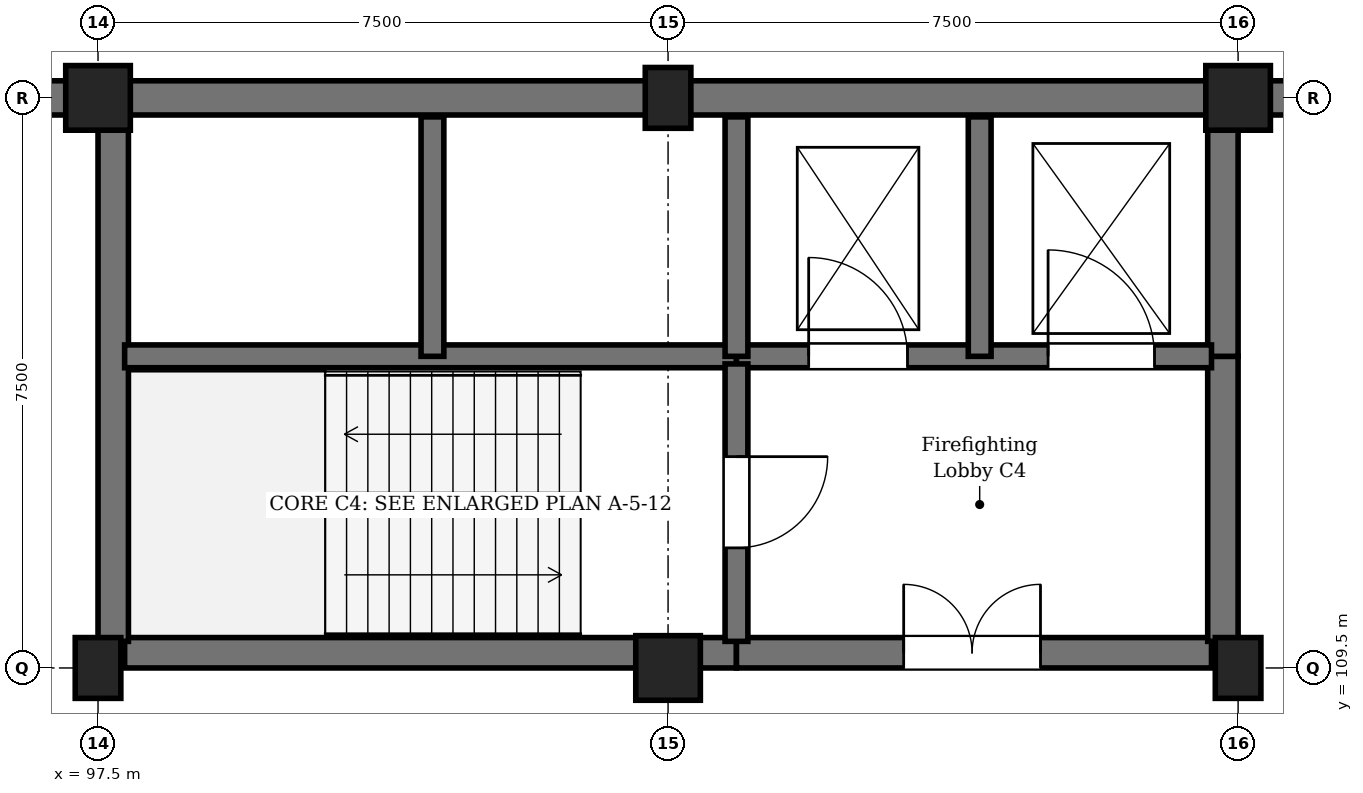
"""IFC4 building model, lengths in metres.
Left out: names, types, materials, properties, quantities, classifications, styles, units other than length and angle.
Written with IfcOpenShell. Run it as: python <this file> out.ifc"""

import sys

from ifc_helpers import new_model, si_unit, direction, frame, frame_2d, origin, origin_2d, place, context, subcontext, project, spatial, rectangle, extrude, element, fill, save


model = new_model("IFC4")
c1 = context("Model", 3, precision=1e-05, world=origin(), true_north=direction((0.0, 1.0)))
c2 = subcontext(c1, "Body", "Model", "MODEL_VIEW")
j1 = project(units=[si_unit("LENGTHUNIT", "METRE"), si_unit("PLANEANGLEUNIT", "RADIAN")], contexts=[c1])
p1 = place(None, origin())
s1 = spatial("IfcSite", under=j1, at=p1, CompositionType="ELEMENT")
p2 = place(p1, origin())
s2 = spatial("IfcBuilding", under=s1, at=p2, CompositionType="ELEMENT")
p3 = place(p2, frame((0.0, 0.0, -4.5)))
s3 = spatial("IfcBuildingStorey", under=s2, at=p3, CompositionType="ELEMENT", Elevation=-4.5)
p4 = place(p3, frame((97.5, 109.5, 0.0), z_axis=(0.0, 0.0, 1.0), x_axis=(1.0, 0.0, 0.0)))
e1 = element("IfcColumn", 1, at=p4, inside=s3, PredefinedType="COLUMN", context=c2, shape_type="SweptSolid", body=[
    extrude(rectangle(XDim=0.6, YDim=0.8, at=origin_2d()), origin(), (0.0, 0.0, 1.0), 4.5),
])
for number, where, z_axis, x_axis in (
    (2, (97.5, 117.0, 0.0), (0.0, 0.0, 1.0), (1.0, 0.0, 0.0)),
    (3, (105.0, 109.5, 0.0), (0.0, 0.0, 1.0), (1.0, 0.0, 0.0)),
):
    element("IfcColumn", number, at=place(p3, frame(where, z_axis=z_axis, x_axis=x_axis)), inside=s3, PredefinedType="COLUMN", context=c2, shape_type="SweptSolid", body=[
        extrude(rectangle(XDim=0.85, YDim=0.85, at=origin_2d()), origin(), (0.0, 0.0, 1.0), 4.5),
    ])
for number, where, z_axis, x_axis in (
    (4, (105.0, 117.0, 0.0), (0.0, 0.0, 1.0), (1.0, 0.0, 0.0)),
    (5, (112.5, 109.5, 0.0), (0.0, 0.0, 1.0), (1.0, 0.0, 0.0)),
):
    element("IfcColumn", number, at=place(p3, frame(where, z_axis=z_axis, x_axis=x_axis)), inside=s3, PredefinedType="COLUMN", context=c2, shape_type="SweptSolid", body=[
        extrude(rectangle(XDim=0.6, YDim=0.8, at=origin_2d()), origin(), (0.0, 0.0, 1.0), 4.5),
    ])
p5 = place(p3, frame((112.5, 117.0, 0.0), z_axis=(0.0, 0.0, 1.0), x_axis=(1.0, 0.0, 0.0)))
e6 = element("IfcColumn", 6, at=p5, inside=s3, PredefinedType="COLUMN", context=c2, shape_type="SweptSolid", body=[
    extrude(rectangle(XDim=0.85, YDim=0.85, at=origin_2d()), origin(), (0.0, 0.0, 1.0), 4.5),
])
for number, where, z_axis, x_axis in (
    (7, (90.0, 117.0, 0.0), (0.0, 0.0, 1.0), (1.0, 0.0, 0.0)),
    (8, (97.5, 117.0, 0.0), (0.0, 0.0, 1.0), (1.0, 0.0, 0.0)),
    (9, (105.0, 117.0, 0.0), (0.0, 0.0, 1.0), (1.0, 0.0, 0.0)),
    (10, (112.5, 117.0, 0.0), (0.0, 0.0, 1.0), (1.0, 0.0, 0.0)),
):
    element("IfcWall", number, at=place(p3, frame(where, z_axis=z_axis, x_axis=x_axis)), inside=s3, PredefinedType="SOLIDWALL", context=c2, shape_type="SweptSolid", body=[
        extrude(rectangle(XDim=7.5, YDim=0.45, at=frame_2d((3.75, 0.0))), origin(), (0.0, 0.0, 1.0), 4.14),
    ])
p6 = place(p3, frame((97.85, 109.7, 0.0), z_axis=(0.0, 0.0, 1.0), x_axis=(1.0, 0.0, 0.0)))
e11 = element("IfcWall", 11, at=p6, inside=s3, PredefinedType="SHEAR", context=c2, shape_type="SweptSolid", body=[
    extrude(rectangle(XDim=8.05, YDim=0.4, at=frame_2d((4.025, 0.0))), origin(), (0.0, 0.0, 1.0), 4.14),
])
p7 = place(p3, frame((105.9, 109.7, 0.0), z_axis=(0.0, 0.0, 1.0), x_axis=(1.0, 0.0, 0.0)))
e12 = element("IfcWall", 12, at=p7, inside=s3, PredefinedType="SHEAR", context=c2, shape_type="SweptSolid", body=[
    extrude(rectangle(XDim=6.25, YDim=0.4, at=frame_2d((3.125, 0.0))), origin(), (0.0, 0.0, 1.0), 4.14),
])
p8 = place(p7, frame((2.2, 0.0, 0.0)))
e13 = element("IfcOpeningElement", 13, at=p8, cuts=e12, PredefinedType="OPENING", context=c2, shape_type="SweptSolid", body=[
    extrude(rectangle(XDim=1.8, YDim=2.25, at=frame_2d((0.9, 1.125))), frame((0.0, 0.21, 0.0), z_axis=(0.0, -1.0, 0.0), x_axis=(1.0, 0.0, 0.0)), (0.0, 0.0, 1.0), 0.42),
])
p9 = place(p3, frame((97.7, 109.85, 0.0), z_axis=(0.0, 0.0, 1.0), x_axis=(0.0, 1.0, 0.0)))
e14 = element("IfcWall", 14, at=p9, inside=s3, PredefinedType="SHEAR", context=c2, shape_type="SweptSolid", body=[
    extrude(rectangle(XDim=6.8, YDim=0.4, at=frame_2d((3.4, 0.0))), origin(), (0.0, 0.0, 1.0), 4.14),
])
p10 = place(p3, frame((112.3, 109.85, 0.0), z_axis=(0.0, 0.0, 1.0), x_axis=(0.0, 1.0, 0.0)))
e15 = element("IfcWall", 15, at=p10, inside=s3, PredefinedType="SHEAR", context=c2, shape_type="SweptSolid", body=[
    extrude(rectangle(XDim=3.75, YDim=0.4, at=frame_2d((1.875, 0.0))), origin(), (0.0, 0.0, 1.0), 4.14),
])
p11 = place(p3, frame((112.3, 113.6, 0.0), z_axis=(0.0, 0.0, 1.0), x_axis=(0.0, 1.0, 0.0)))
e16 = element("IfcWall", 16, at=p11, inside=s3, PredefinedType="SHEAR", context=c2, shape_type="SweptSolid", body=[
    extrude(rectangle(XDim=3.05, YDim=0.4, at=frame_2d((1.525, 0.0))), origin(), (0.0, 0.0, 1.0), 4.14),
])
p12 = place(p3, frame((97.85, 113.6, 0.0), z_axis=(0.0, 0.0, 1.0), x_axis=(1.0, 0.0, 0.0)))
e17 = element("IfcWall", 17, at=p12, inside=s3, PredefinedType="SHEAR", context=c2, shape_type="SweptSolid", body=[
    extrude(rectangle(XDim=8.05, YDim=0.3, at=frame_2d((4.025, 0.0))), origin(), (0.0, 0.0, 1.0), 4.14),
])
p13 = place(p3, frame((105.9, 113.6, 0.0), z_axis=(0.0, 0.0, 1.0), x_axis=(1.0, 0.0, 0.0)))
e18 = element("IfcWall", 18, at=p13, inside=s3, PredefinedType="SHEAR", context=c2, shape_type="SweptSolid", body=[
    extrude(rectangle(XDim=6.25, YDim=0.3, at=frame_2d((3.125, 0.0))), origin(), (0.0, 0.0, 1.0), 4.14),
])
p14 = place(p13, frame((0.95, 0.0, 0.0)))
e19 = element("IfcOpeningElement", 19, at=p14, cuts=e18, PredefinedType="OPENING", context=c2, shape_type="SweptSolid", body=[
    extrude(rectangle(XDim=1.3, YDim=2.2, at=frame_2d((0.65, 1.1))), frame((0.0, 0.16, 0.0), z_axis=(0.0, -1.0, 0.0), x_axis=(1.0, 0.0, 0.0)), (0.0, 0.0, 1.0), 0.32),
])
p15 = place(p13, frame((4.1, 0.0, 0.0)))
e20 = element("IfcOpeningElement", 20, at=p15, cuts=e18, PredefinedType="OPENING", context=c2, shape_type="SweptSolid", body=[
    extrude(rectangle(XDim=1.4, YDim=2.25, at=frame_2d((0.7, 1.125))), frame((0.0, 0.16, 0.0), z_axis=(0.0, -1.0, 0.0), x_axis=(1.0, 0.0, 0.0)), (0.0, 0.0, 1.0), 0.32),
])
p16 = place(p3, frame((105.9, 113.5, 0.0), z_axis=(0.0, 0.0, 1.0), x_axis=(0.0, -1.0, 0.0)))
e21 = element("IfcWall", 21, at=p16, inside=s3, PredefinedType="SHEAR", context=c2, shape_type="SweptSolid", body=[
    extrude(rectangle(XDim=3.65, YDim=0.3, at=frame_2d((1.825, 0.0))), origin(), (0.0, 0.0, 1.0), 4.14),
])
p17 = place(p16, frame((1.22, 0.0, 0.0)))
e22 = element("IfcOpeningElement", 22, at=p17, cuts=e21, PredefinedType="OPENING", context=c2, shape_type="SweptSolid", body=[
    extrude(rectangle(XDim=1.2, YDim=2.25, at=frame_2d((0.6, 1.125))), frame((0.0, 0.16, 0.0), z_axis=(0.0, -1.0, 0.0), x_axis=(1.0, 0.0, 0.0)), (0.0, 0.0, 1.0), 0.32),
])
for number, where, z_axis, x_axis in (
    (23, (101.9, 113.6, 0.0), (0.0, 0.0, 1.0), (0.0, 1.0, 0.0)),
    (24, (105.9, 113.6, 0.0), (0.0, 0.0, 1.0), (0.0, 1.0, 0.0)),
    (25, (109.1, 113.6, 0.0), (0.0, 0.0, 1.0), (0.0, 1.0, 0.0)),
):
    element("IfcWall", number, at=place(p3, frame(where, z_axis=z_axis, x_axis=x_axis)), inside=s3, PredefinedType="SHEAR", context=c2, shape_type="SweptSolid", body=[
        extrude(rectangle(XDim=3.15, YDim=0.3, at=frame_2d((1.575, 0.0))), origin(), (0.0, 0.0, 1.0), 4.14),
    ])
p18 = place(p8, origin())
e26 = element("IfcDoor", 26, at=p18, inside=s3, OperationType="DOUBLE_DOOR_SINGLE_SWING", PredefinedType="DOOR", context=c2, shape_type="SweptSolid", body=[
    extrude(rectangle(XDim=1.8, YDim=2.25, at=frame_2d((0.9, 1.125))), frame((0.0, 0.025, 0.0), z_axis=(0.0, -1.0, 0.0), x_axis=(1.0, 0.0, 0.0)), (0.0, 0.0, 1.0), 0.05),
])
fill(e13, e26)
p19 = place(p14, origin())
e27 = element("IfcDoor", 27, at=p19, inside=s3, OperationType="DOUBLE_DOOR_SLIDING", PredefinedType="DOOR", context=c2, shape_type="SweptSolid", body=[
    extrude(rectangle(XDim=1.3, YDim=2.2, at=frame_2d((0.65, 1.1))), frame((0.0, 0.025, 0.0), z_axis=(0.0, -1.0, 0.0), x_axis=(1.0, 0.0, 0.0)), (0.0, 0.0, 1.0), 0.05),
])
fill(e19, e27)
p20 = place(p15, origin())
e28 = element("IfcDoor", 28, at=p20, inside=s3, OperationType="DOUBLE_DOOR_SLIDING", PredefinedType="DOOR", context=c2, shape_type="SweptSolid", body=[
    extrude(rectangle(XDim=1.4, YDim=2.25, at=frame_2d((0.7, 1.125))), frame((0.0, 0.025, 0.0), z_axis=(0.0, -1.0, 0.0), x_axis=(1.0, 0.0, 0.0)), (0.0, 0.0, 1.0), 0.05),
])
fill(e20, e28)
p21 = place(p17, origin())
e29 = element("IfcDoor", 29, at=p21, inside=s3, OperationType="SINGLE_SWING_LEFT", PredefinedType="DOOR", context=c2, shape_type="SweptSolid", body=[
    extrude(rectangle(XDim=1.2, YDim=2.25, at=frame_2d((0.6, 1.125))), frame((0.0, 0.025, 0.0), z_axis=(0.0, -1.0, 0.0), x_axis=(1.0, 0.0, 0.0)), (0.0, 0.0, 1.0), 0.05),
])
fill(e22, e29)
save(model, sys.argv[1])
